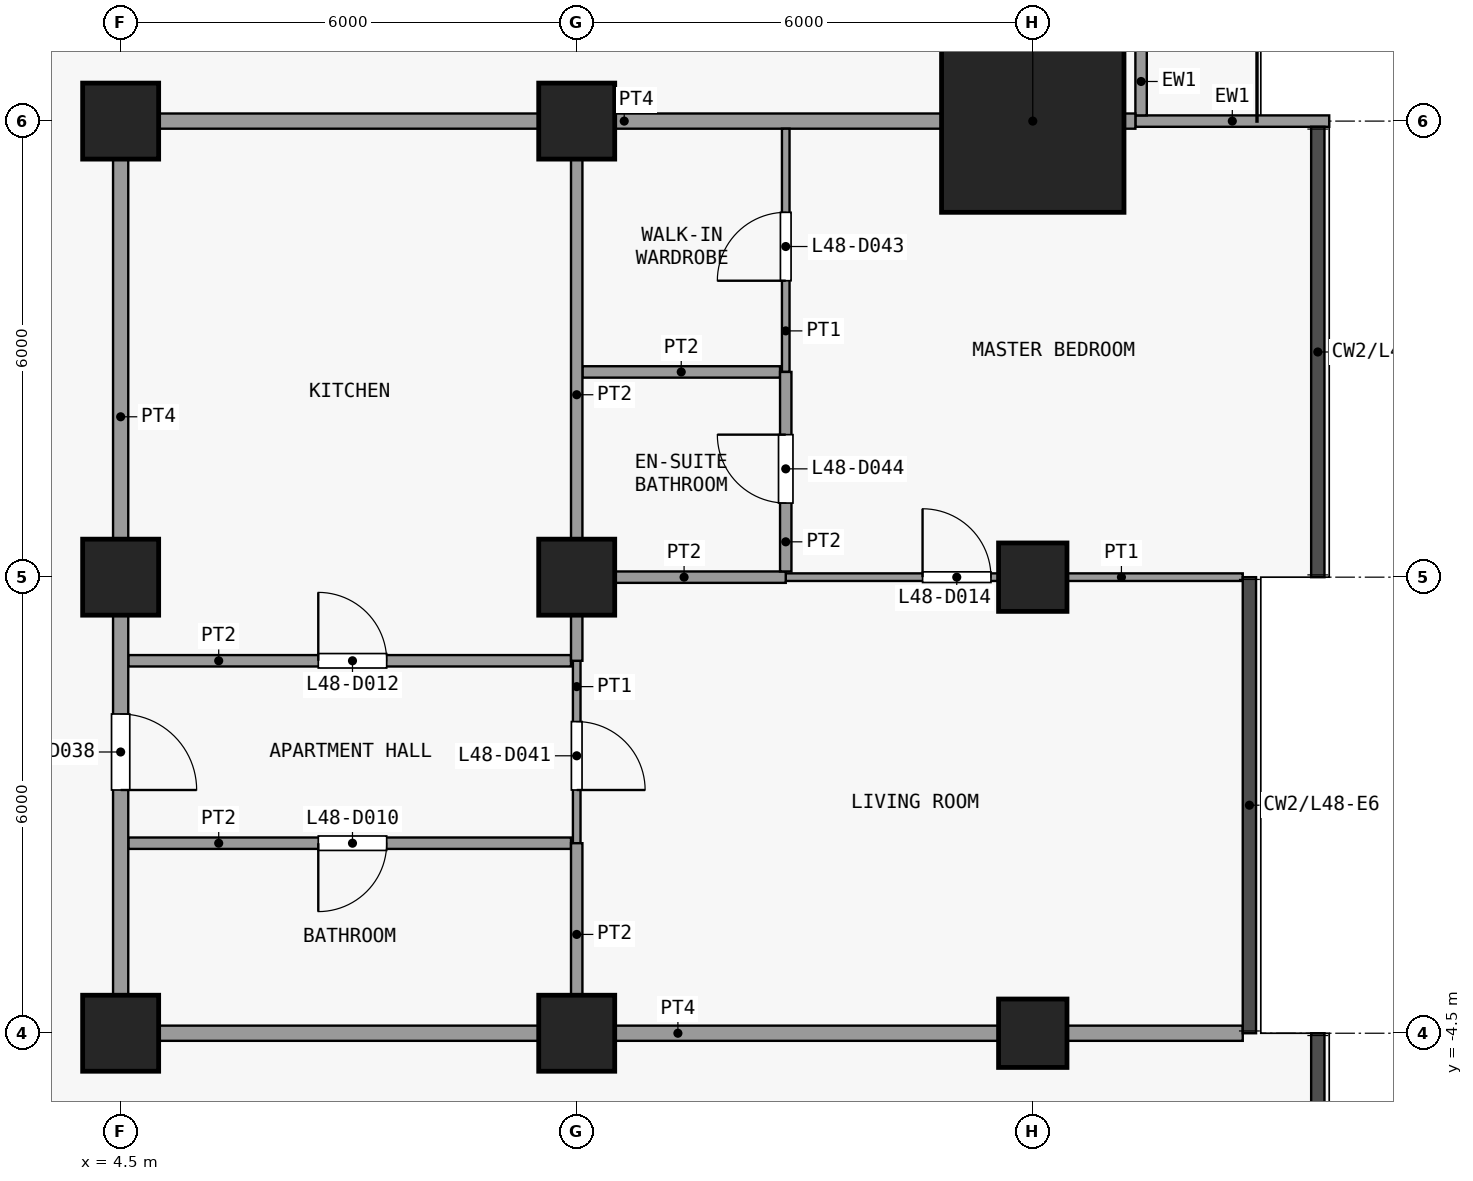
"""IFC4 building model, lengths in metres.
Left out: names, types, materials, properties, quantities, classifications, styles, units other than length and angle.
Written with IfcOpenShell. Run it as: python <this file> out.ifc"""

import sys

from ifc_helpers import new_model, si_unit, direction, frame, frame_2d, origin, origin_2d, place, context, subcontext, project, spatial, rectangle, extrude, element, fill, save


model = new_model("IFC4")
c1 = context("Model", 3, precision=1e-05, world=origin(), true_north=direction((0.0, 1.0)))
c2 = subcontext(c1, "Body", "Model", "MODEL_VIEW")
j1 = project(units=[si_unit("LENGTHUNIT", "METRE"), si_unit("PLANEANGLEUNIT", "RADIAN")], contexts=[c1])
p1 = place(None, origin())
s1 = spatial("IfcSite", under=j1, at=p1, CompositionType="ELEMENT")
p2 = place(p1, origin())
s2 = spatial("IfcBuilding", under=s1, at=p2, CompositionType="ELEMENT")
p3 = place(p2, frame((0.0, 0.0, 192.5)))
s3 = spatial("IfcBuildingStorey", under=s2, at=p3, CompositionType="ELEMENT", Elevation=192.5)
for number, where, z_axis, x_axis in (
    (1, (4.5, -4.5, 0.0), (0.0, 0.0, 1.0), (1.0, 0.0, 0.0)),
    (2, (4.5, 1.5, 0.0), (0.0, 0.0, 1.0), (1.0, 0.0, 0.0)),
    (3, (4.5, 7.5, 0.0), (0.0, 0.0, 1.0), (1.0, 0.0, 0.0)),
    (4, (10.5, -4.5, 0.0), (0.0, 0.0, 1.0), (1.0, 0.0, 0.0)),
    (5, (10.5, 1.5, 0.0), (0.0, 0.0, 1.0), (1.0, 0.0, 0.0)),
    (6, (10.5, 7.5, 0.0), (0.0, 0.0, 1.0), (1.0, 0.0, 0.0)),
):
    element("IfcColumn", number, at=place(p3, frame(where, z_axis=z_axis, x_axis=x_axis)), inside=s3, PredefinedType="COLUMN", context=c2, shape_type="SweptSolid", body=[
        extrude(rectangle(XDim=1.0, YDim=1.0, at=origin_2d()), origin(), (0.0, 0.0, 1.0), 3.6),
    ])
for number, where, z_axis, x_axis in (
    (7, (16.5, -4.5, 0.0), (0.0, 0.0, 1.0), (1.0, 0.0, 0.0)),
    (8, (16.5, 1.5, 0.0), (0.0, 0.0, 1.0), (1.0, 0.0, 0.0)),
):
    element("IfcColumn", number, at=place(p3, frame(where, z_axis=z_axis, x_axis=x_axis)), inside=s3, PredefinedType="COLUMN", context=c2, shape_type="SweptSolid", body=[
        extrude(rectangle(XDim=0.9, YDim=0.9, at=origin_2d()), origin(), (0.0, 0.0, 1.0), 3.6),
    ])
p4 = place(p3, frame((16.5, 7.5, 0.0), z_axis=(0.0, 0.0, 1.0), x_axis=(1.0, 0.0, 0.0)))
e9 = element("IfcColumn", 9, at=p4, inside=s3, PredefinedType="COLUMN", context=c2, shape_type="SweptSolid", body=[
    extrude(rectangle(XDim=2.4, YDim=2.4, at=origin_2d()), origin(), (0.0, 0.0, 1.0), 3.6),
])
p5 = place(p3, frame((17.85, 7.5, 0.0), z_axis=(0.0, 0.0, 1.0), x_axis=(1.0, 0.0, 0.0)))
e10 = element("IfcWall", 10, at=p5, inside=s3, PredefinedType="SOLIDWALL", context=c2, shape_type="SweptSolid", body=[
    extrude(rectangle(XDim=2.55, YDim=0.15, at=frame_2d((1.275, 0.0))), origin(), (0.0, 0.0, 1.0), 3.3),
])
p6 = place(p3, frame((17.925, 13.425, 0.0), z_axis=(0.0, 0.0, 1.0), x_axis=(0.0, -1.0, 0.0)))
e11 = element("IfcWall", 11, at=p6, inside=s3, PredefinedType="SOLIDWALL", context=c2, shape_type="SweptSolid", body=[
    extrude(rectangle(XDim=5.85, YDim=0.15, at=frame_2d((2.925, 0.0))), origin(), (0.0, 0.0, 1.0), 3.3),
])
p7 = place(p6, frame((0.825, 0.0, 0.0)))
e12 = element("IfcOpeningElement", 12, at=p7, cuts=e11, PredefinedType="OPENING", context=c2, shape_type="SweptSolid", body=[
    extrude(rectangle(XDim=1.2, YDim=2.4, at=frame_2d((0.6, 1.2))), frame((0.0, 0.085, 0.0), z_axis=(0.0, -1.0, 0.0), x_axis=(1.0, 0.0, 0.0)), (0.0, 0.0, 1.0), 0.17),
])
p8 = place(p6, frame((3.038, 0.0, 0.9)))
e13 = element("IfcOpeningElement", 13, at=p8, cuts=e11, PredefinedType="OPENING", context=c2, shape_type="SweptSolid", body=[
    extrude(rectangle(XDim=1.8, YDim=2.1, at=frame_2d((0.9, 1.05))), frame((0.0, 0.085, 0.0), z_axis=(0.0, -1.0, 0.0), x_axis=(1.0, 0.0, 0.0)), (0.0, 0.0, 1.0), 0.17),
])
p9 = place(p3, frame((4.4, -4.5, 0.0), z_axis=(0.0, 0.0, 1.0), x_axis=(1.0, 0.0, 0.0)))
e14 = element("IfcWall", 14, at=p9, inside=s3, PredefinedType="PARTITIONING", context=c2, shape_type="SweptSolid", body=[
    extrude(rectangle(XDim=14.863, YDim=0.2, at=frame_2d((7.431, 0.0))), origin(), (0.0, 0.0, 1.0), 3.3),
])
p10 = place(p3, frame((4.6, -2.0, 0.0), z_axis=(0.0, 0.0, 1.0), x_axis=(1.0, 0.0, 0.0)))
e15 = element("IfcWall", 15, at=p10, inside=s3, PredefinedType="PARTITIONING", context=c2, shape_type="SweptSolid", body=[
    extrude(rectangle(XDim=5.825, YDim=0.15, at=frame_2d((2.913, 0.0))), origin(), (0.0, 0.0, 1.0), 3.3),
])
p11 = place(p10, frame((2.5, 0.0, 0.0)))
e16 = element("IfcOpeningElement", 16, at=p11, cuts=e15, PredefinedType="OPENING", context=c2, shape_type="SweptSolid", body=[
    extrude(rectangle(XDim=0.9, YDim=2.1, at=frame_2d((0.45, 1.05))), frame((0.0, 0.085, 0.0), z_axis=(0.0, -1.0, 0.0), x_axis=(1.0, 0.0, 0.0)), (0.0, 0.0, 1.0), 0.17),
])
p12 = place(p3, frame((4.6, 0.4, 0.0), z_axis=(0.0, 0.0, 1.0), x_axis=(1.0, 0.0, 0.0)))
e17 = element("IfcWall", 17, at=p12, inside=s3, PredefinedType="PARTITIONING", context=c2, shape_type="SweptSolid", body=[
    extrude(rectangle(XDim=5.825, YDim=0.15, at=frame_2d((2.913, 0.0))), origin(), (0.0, 0.0, 1.0), 3.3),
])
p13 = place(p12, frame((2.5, 0.0, 0.0)))
e18 = element("IfcOpeningElement", 18, at=p13, cuts=e17, PredefinedType="OPENING", context=c2, shape_type="SweptSolid", body=[
    extrude(rectangle(XDim=0.9, YDim=2.1, at=frame_2d((0.45, 1.05))), frame((0.0, 0.085, 0.0), z_axis=(0.0, -1.0, 0.0), x_axis=(1.0, 0.0, 0.0)), (0.0, 0.0, 1.0), 0.17),
])
p14 = place(p3, frame((13.25, 1.5, 0.0), z_axis=(0.0, 0.0, 1.0), x_axis=(1.0, 0.0, 0.0)))
e19 = element("IfcWall", 19, at=p14, inside=s3, PredefinedType="PARTITIONING", context=c2, shape_type="SweptSolid", body=[
    extrude(rectangle(XDim=6.012, YDim=0.1, at=frame_2d((3.006, 0.0))), origin(), (0.0, 0.0, 1.0), 3.3),
])
p15 = place(p14, frame((1.8, 0.0, 0.0)))
e20 = element("IfcOpeningElement", 20, at=p15, cuts=e19, PredefinedType="OPENING", context=c2, shape_type="SweptSolid", body=[
    extrude(rectangle(XDim=0.9, YDim=2.1, at=frame_2d((0.45, 1.05))), frame((0.0, 0.06, 0.0), z_axis=(0.0, -1.0, 0.0), x_axis=(1.0, 0.0, 0.0)), (0.0, 0.0, 1.0), 0.12),
])
p16 = place(p3, frame((10.575, 1.5, 0.0), z_axis=(0.0, 0.0, 1.0), x_axis=(1.0, 0.0, 0.0)))
e21 = element("IfcWall", 21, at=p16, inside=s3, PredefinedType="PARTITIONING", context=c2, shape_type="SweptSolid", body=[
    extrude(rectangle(XDim=2.675, YDim=0.15, at=frame_2d((1.337, 0.0))), origin(), (0.0, 0.0, 1.0), 3.3),
])
p17 = place(p3, frame((10.575, 4.2, 0.0), z_axis=(0.0, 0.0, 1.0), x_axis=(1.0, 0.0, 0.0)))
e22 = element("IfcWall", 22, at=p17, inside=s3, PredefinedType="PARTITIONING", context=c2, shape_type="SweptSolid", body=[
    extrude(rectangle(XDim=2.6, YDim=0.15, at=frame_2d((1.3, 0.0))), origin(), (0.0, 0.0, 1.0), 3.3),
])
p18 = place(p3, frame((4.4, 7.5, 0.0), z_axis=(0.0, 0.0, 1.0), x_axis=(1.0, 0.0, 0.0)))
e23 = element("IfcWall", 23, at=p18, inside=s3, PredefinedType="PARTITIONING", context=c2, shape_type="SweptSolid", body=[
    extrude(rectangle(XDim=13.45, YDim=0.2, at=frame_2d((6.725, 0.0))), origin(), (0.0, 0.0, 1.0), 3.3),
])
p19 = place(p3, frame((4.5, -4.4, 0.0), z_axis=(0.0, 0.0, 1.0), x_axis=(0.0, 1.0, 0.0)))
e24 = element("IfcWall", 24, at=p19, inside=s3, PredefinedType="PARTITIONING", context=c2, shape_type="SweptSolid", body=[
    extrude(rectangle(XDim=11.8, YDim=0.2, at=frame_2d((5.9, 0.0))), origin(), (0.0, 0.0, 1.0), 3.3),
])
p20 = place(p19, frame((3.1, 0.0, 0.0)))
e25 = element("IfcOpeningElement", 25, at=p20, cuts=e24, PredefinedType="OPENING", context=c2, shape_type="SweptSolid", body=[
    extrude(rectangle(XDim=1.0, YDim=2.1, at=frame_2d((0.5, 1.05))), frame((0.0, 0.11, 0.0), z_axis=(0.0, -1.0, 0.0), x_axis=(1.0, 0.0, 0.0)), (0.0, 0.0, 1.0), 0.22),
])
p21 = place(p3, frame((10.5, -2.0, 0.0), z_axis=(0.0, 0.0, 1.0), x_axis=(0.0, 1.0, 0.0)))
e26 = element("IfcWall", 26, at=p21, inside=s3, PredefinedType="PARTITIONING", context=c2, shape_type="SweptSolid", body=[
    extrude(rectangle(XDim=2.4, YDim=0.1, at=frame_2d((1.2, 0.0))), origin(), (0.0, 0.0, 1.0), 3.3),
])
p22 = place(p21, frame((0.7, 0.0, 0.0)))
e27 = element("IfcOpeningElement", 27, at=p22, cuts=e26, PredefinedType="OPENING", context=c2, shape_type="SweptSolid", body=[
    extrude(rectangle(XDim=0.9, YDim=2.1, at=frame_2d((0.45, 1.05))), frame((0.0, 0.06, 0.0), z_axis=(0.0, -1.0, 0.0), x_axis=(1.0, 0.0, 0.0)), (0.0, 0.0, 1.0), 0.12),
])
p23 = place(p3, frame((10.5, -4.4, 0.0), z_axis=(0.0, 0.0, 1.0), x_axis=(0.0, 1.0, 0.0)))
e28 = element("IfcWall", 28, at=p23, inside=s3, PredefinedType="PARTITIONING", context=c2, shape_type="SweptSolid", body=[
    extrude(rectangle(XDim=2.4, YDim=0.15, at=frame_2d((1.2, 0.0))), origin(), (0.0, 0.0, 1.0), 3.3),
])
p24 = place(p3, frame((10.5, 0.4, 0.0), z_axis=(0.0, 0.0, 1.0), x_axis=(0.0, 1.0, 0.0)))
e29 = element("IfcWall", 29, at=p24, inside=s3, PredefinedType="PARTITIONING", context=c2, shape_type="SweptSolid", body=[
    extrude(rectangle(XDim=7.0, YDim=0.15, at=frame_2d((3.5, 0.0))), origin(), (0.0, 0.0, 1.0), 3.3),
])
p25 = place(p3, frame((13.25, 4.2, 0.0), z_axis=(0.0, 0.0, 1.0), x_axis=(0.0, 1.0, 0.0)))
e30 = element("IfcWall", 30, at=p25, inside=s3, PredefinedType="PARTITIONING", context=c2, shape_type="SweptSolid", body=[
    extrude(rectangle(XDim=3.2, YDim=0.1, at=frame_2d((1.6, 0.0))), origin(), (0.0, 0.0, 1.0), 3.3),
])
p26 = place(p25, frame((1.2, 0.0, 0.0)))
e31 = element("IfcOpeningElement", 31, at=p26, cuts=e30, PredefinedType="OPENING", context=c2, shape_type="SweptSolid", body=[
    extrude(rectangle(XDim=0.9, YDim=2.1, at=frame_2d((0.45, 1.05))), frame((0.0, 0.06, 0.0), z_axis=(0.0, -1.0, 0.0), x_axis=(1.0, 0.0, 0.0)), (0.0, 0.0, 1.0), 0.12),
])
p27 = place(p3, frame((13.25, 1.575, 0.0), z_axis=(0.0, 0.0, 1.0), x_axis=(0.0, 1.0, 0.0)))
e32 = element("IfcWall", 32, at=p27, inside=s3, PredefinedType="PARTITIONING", context=c2, shape_type="SweptSolid", body=[
    extrude(rectangle(XDim=2.625, YDim=0.15, at=frame_2d((1.312, 0.0))), origin(), (0.0, 0.0, 1.0), 3.3),
])
p28 = place(p27, frame((0.9, 0.0, 0.0)))
e33 = element("IfcOpeningElement", 33, at=p28, cuts=e32, PredefinedType="OPENING", context=c2, shape_type="SweptSolid", body=[
    extrude(rectangle(XDim=0.9, YDim=2.1, at=frame_2d((0.45, 1.05))), frame((0.0, 0.085, 0.0), z_axis=(0.0, -1.0, 0.0), x_axis=(1.0, 0.0, 0.0)), (0.0, 0.0, 1.0), 0.17),
])
p29 = place(p11, origin())
e34 = element("IfcDoor", 34, at=p29, inside=s3, OperationType="SINGLE_SWING_LEFT", PredefinedType="DOOR", context=c2, shape_type="SweptSolid", body=[
    extrude(rectangle(XDim=0.9, YDim=2.1, at=frame_2d((0.45, 1.05))), frame((0.0, 0.025, 0.0), z_axis=(0.0, -1.0, 0.0), x_axis=(1.0, 0.0, 0.0)), (0.0, 0.0, 1.0), 0.05),
])
fill(e16, e34)
p30 = place(p13, origin())
e35 = element("IfcDoor", 35, at=p30, inside=s3, OperationType="SINGLE_SWING_RIGHT", PredefinedType="DOOR", context=c2, shape_type="SweptSolid", body=[
    extrude(rectangle(XDim=0.9, YDim=2.1, at=frame_2d((0.45, 1.05))), frame((0.0, 0.025, 0.0), z_axis=(0.0, -1.0, 0.0), x_axis=(1.0, 0.0, 0.0)), (0.0, 0.0, 1.0), 0.05),
])
fill(e18, e35)
p31 = place(p15, origin())
e36 = element("IfcDoor", 36, at=p31, inside=s3, OperationType="SINGLE_SWING_RIGHT", PredefinedType="DOOR", context=c2, shape_type="SweptSolid", body=[
    extrude(rectangle(XDim=0.9, YDim=2.1, at=frame_2d((0.45, 1.05))), frame((0.0, 0.025, 0.0), z_axis=(0.0, -1.0, 0.0), x_axis=(1.0, 0.0, 0.0)), (0.0, 0.0, 1.0), 0.05),
])
fill(e20, e36)
p32 = place(p20, origin())
e37 = element("IfcDoor", 37, at=p32, inside=s3, OperationType="SINGLE_SWING_LEFT", PredefinedType="DOOR", context=c2, shape_type="SweptSolid", body=[
    extrude(rectangle(XDim=1.0, YDim=2.1, at=frame_2d((0.5, 1.05))), frame((0.0, 0.025, 0.0), z_axis=(0.0, -1.0, 0.0), x_axis=(1.0, 0.0, 0.0)), (0.0, 0.0, 1.0), 0.05),
])
fill(e25, e37)
p33 = place(p22, origin())
e38 = element("IfcDoor", 38, at=p33, inside=s3, OperationType="SINGLE_SWING_LEFT", PredefinedType="DOOR", context=c2, shape_type="SweptSolid", body=[
    extrude(rectangle(XDim=0.9, YDim=2.1, at=frame_2d((0.45, 1.05))), frame((0.0, 0.025, 0.0), z_axis=(0.0, -1.0, 0.0), x_axis=(1.0, 0.0, 0.0)), (0.0, 0.0, 1.0), 0.05),
])
fill(e27, e38)
p34 = place(p26, origin())
e39 = element("IfcDoor", 39, at=p34, inside=s3, OperationType="SINGLE_SWING_RIGHT", PredefinedType="DOOR", context=c2, shape_type="SweptSolid", body=[
    extrude(rectangle(XDim=0.9, YDim=2.1, at=frame_2d((0.45, 1.05))), frame((0.0, 0.025, 0.0), z_axis=(0.0, -1.0, 0.0), x_axis=(1.0, 0.0, 0.0)), (0.0, 0.0, 1.0), 0.05),
])
fill(e31, e39)
p35 = place(p28, origin())
e40 = element("IfcDoor", 40, at=p35, inside=s3, OperationType="SINGLE_SWING_LEFT", PredefinedType="DOOR", context=c2, shape_type="SweptSolid", body=[
    extrude(rectangle(XDim=0.9, YDim=2.1, at=frame_2d((0.45, 1.05))), frame((0.0, 0.025, 0.0), z_axis=(0.0, -1.0, 0.0), x_axis=(1.0, 0.0, 0.0)), (0.0, 0.0, 1.0), 0.05),
])
fill(e33, e40)
save(model, sys.argv[1])
